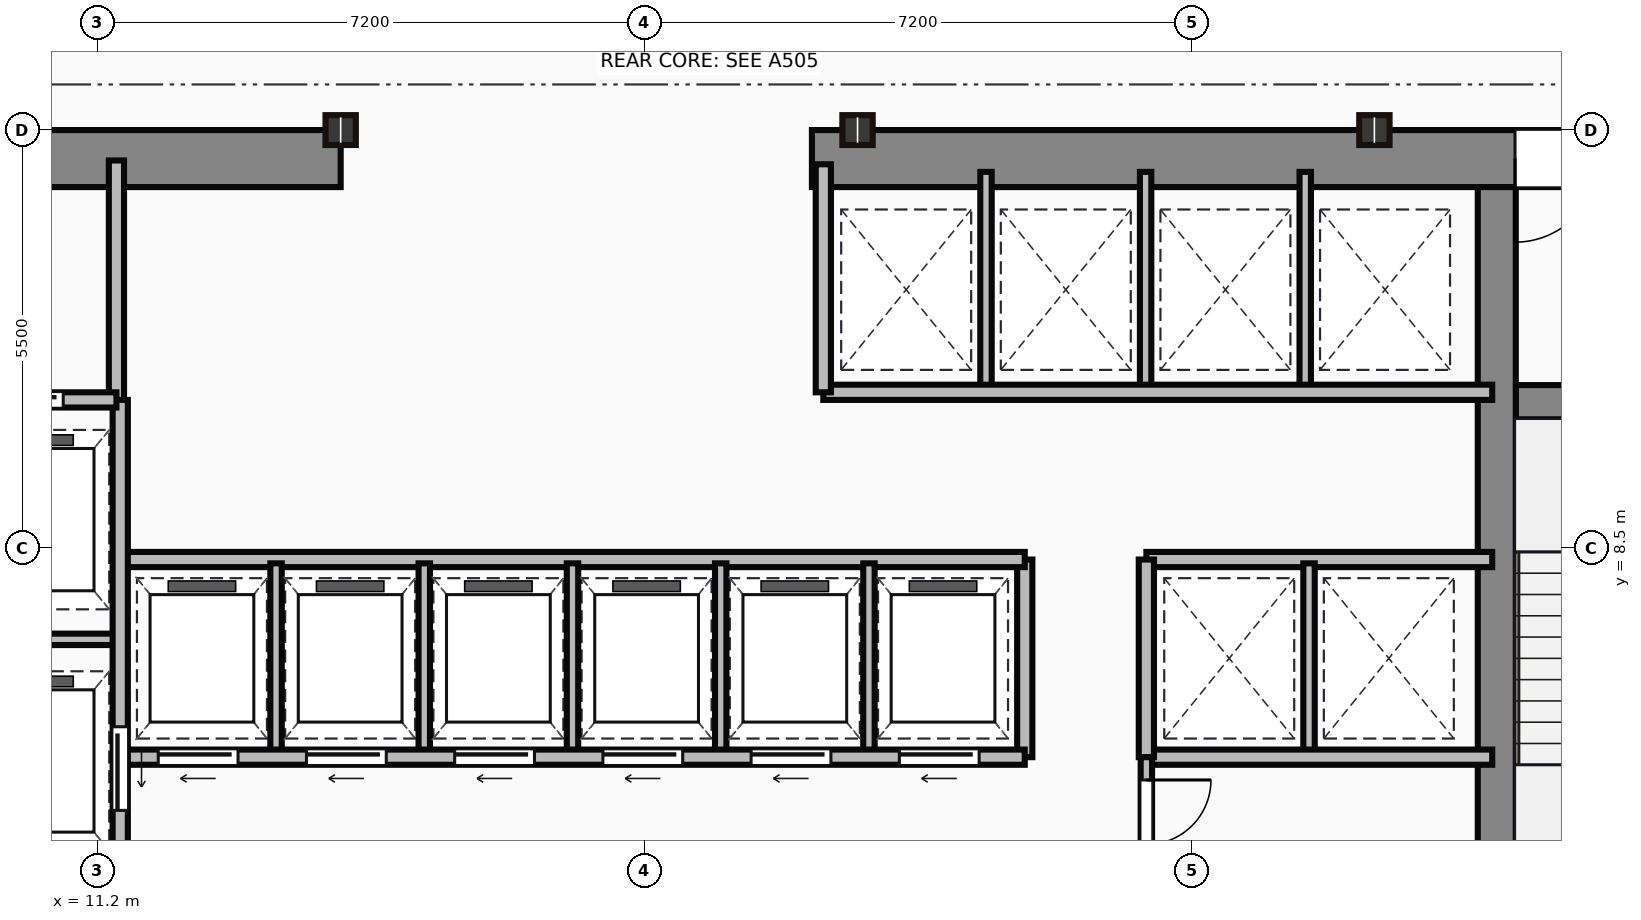
"""IFC4 building model, lengths in metres.
Left out: names, types, materials, properties, quantities, classifications, styles, units other than length and angle.
Written with IfcOpenShell. Run it as: python <this file> out.ifc"""

import sys

from ifc_helpers import new_model, si_unit, direction, frame, frame_2d, origin, origin_2d, place, context, subcontext, project, spatial, rectangle, i_section, extrude, source, transform, mapped, element, fill, save


model = new_model("IFC4")
c1 = context("Model", 3, precision=1e-05, world=origin(), true_north=direction((0.0, 1.0)))
c2 = subcontext(c1, "Body", "Model", "MODEL_VIEW")
j1 = project(units=[si_unit("LENGTHUNIT", "METRE"), si_unit("PLANEANGLEUNIT", "RADIAN")], contexts=[c1])
p1 = place(None, origin())
s1 = spatial("IfcSite", under=j1, at=p1, CompositionType="ELEMENT")
p2 = place(p1, origin())
s2 = spatial("IfcBuilding", under=s1, at=p2, CompositionType="ELEMENT")
p3 = place(p2, frame((0.0, 0.0, 106.9)))
s3 = spatial("IfcBuildingStorey", under=s2, at=p3, CompositionType="ELEMENT", Elevation=106.9)
m1 = source(origin(), c2, "Body", "SweptSolid", [
    extrude(rectangle(XDim=9.1, YDim=0.75, at=frame_2d((4.55, 0.0))), origin(), (0.0, 0.0, 1.0), 3.65),
])
p4 = place(p3, frame((5.3, 13.625, 0.0), z_axis=(0.0, 0.0, 1.0), x_axis=(1.0, 0.0, 0.0)))
e1 = element("IfcWall", 1, at=p4, inside=s3, PredefinedType="SHEAR", context=c2, shape_type="MappedRepresentation", body=[
    mapped(m1, transform((0.0, 0.0, 0.0))),
])
p5 = place(p4, frame((4.1, 0.0, 0.0)))
e2 = element("IfcOpeningElement", 2, at=p5, cuts=e1, PredefinedType="OPENING", context=c2, shape_type="SweptSolid", body=[
    extrude(rectangle(XDim=1.1, YDim=2.15, at=frame_2d((0.55, 1.075))), frame((0.0, 0.385, 0.0), z_axis=(0.0, -1.0, 0.0), x_axis=(1.0, 0.0, 0.0)), (0.0, 0.0, 1.0), 0.77),
])
m2 = source(origin(), c2, "Body", "SweptSolid", [
    extrude(rectangle(XDim=12.6, YDim=0.75, at=frame_2d((6.3, 0.0))), origin(), (0.0, 0.0, 1.0), 3.65),
])
p6 = place(p3, frame((20.6, 13.625, 0.0), z_axis=(0.0, 0.0, 1.0), x_axis=(1.0, 0.0, 0.0)))
e3 = element("IfcWall", 3, at=p6, inside=s3, PredefinedType="SHEAR", context=c2, shape_type="MappedRepresentation", body=[
    mapped(m2, transform((0.0, 0.0, 0.0))),
])
p7 = place(p6, frame((9.25, 0.0, 0.0)))
e4 = element("IfcOpeningElement", 4, at=p7, cuts=e3, PredefinedType="OPENING", context=c2, shape_type="SweptSolid", body=[
    extrude(rectangle(XDim=1.1, YDim=2.15, at=frame_2d((0.55, 1.075))), frame((0.0, 0.385, 0.0), z_axis=(0.0, -1.0, 0.0), x_axis=(1.0, 0.0, 0.0)), (0.0, 0.0, 1.0), 0.77),
])
m3 = source(origin(), c2, "Body", "SweptSolid", [
    extrude(rectangle(XDim=12.35, YDim=0.5, at=frame_2d((6.175, 0.0))), origin(), (0.0, 0.0, 1.0), 3.65),
])
p8 = place(p3, frame((29.61, 0.9, 0.0), z_axis=(0.0, 0.0, 1.0), x_axis=(0.0, 1.0, 0.0)))
e5 = element("IfcWall", 5, at=p8, inside=s3, PredefinedType="SHEAR", context=c2, shape_type="MappedRepresentation", body=[
    mapped(m3, transform((0.0, 0.0, 0.0))),
])
m4 = source(origin(), c2, "Body", "SweptSolid", [
    extrude(rectangle(XDim=3.39, YDim=0.45, at=frame_2d((1.695, 0.0))), origin(), (0.0, 0.0, 1.0), 3.65),
])
p9 = place(p3, frame((29.86, 10.42, 0.0), z_axis=(0.0, 0.0, 1.0), x_axis=(1.0, 0.0, 0.0)))
e6 = element("IfcWall", 6, at=p9, inside=s3, PredefinedType="SHEAR", context=c2, shape_type="MappedRepresentation", body=[
    mapped(m4, transform((0.0, 0.0, 0.0))),
])
p10 = place(p9, frame((1.1, 0.0, 0.0)))
e7 = element("IfcOpeningElement", 7, at=p10, cuts=e6, PredefinedType="OPENING", context=c2, shape_type="SweptSolid", body=[
    extrude(rectangle(XDim=1.1, YDim=2.15, at=frame_2d((0.55, 1.075))), frame((0.0, 0.235, 0.0), z_axis=(0.0, -1.0, 0.0), x_axis=(1.0, 0.0, 0.0)), (0.0, 0.0, 1.0), 0.47),
])
m5 = source(origin(), c2, "Body", "SweptSolid", [
    extrude(i_section(OverallWidth=0.399, OverallDepth=0.393, WebThickness=0.023, FlangeThickness=0.037, at=origin_2d()), origin(), (0.0, 0.0, 1.0), 3.65),
])
for number, where, z_axis, x_axis in (
    (8, (14.4, 14.0, 0.0), (0.0, 0.0, 1.0), (1.0, 0.0, 0.0)),
    (9, (21.2, 14.0, 0.0), (0.0, 0.0, 1.0), (1.0, 0.0, 0.0)),
    (10, (28.0, 14.0, 0.0), (0.0, 0.0, 1.0), (1.0, 0.0, 0.0)),
):
    element("IfcColumn", number, at=place(p3, frame(where, z_axis=z_axis, x_axis=x_axis)), inside=s3, PredefinedType="COLUMN", context=c2, shape_type="MappedRepresentation", body=[
        mapped(m5, transform((0.0, 0.0, 0.0))),
    ])
m6 = source(origin(), c2, "Body", "SweptSolid", [
    extrude(rectangle(XDim=3.18, YDim=0.2, at=frame_2d((1.59, 0.0))), origin(), (0.0, 0.0, 1.0), 3.4),
])
p11 = place(p3, frame((11.45, 10.42, 0.0), z_axis=(0.0, 0.0, 1.0), x_axis=(0.0, 1.0, 0.0)))
e11 = element("IfcWall", 11, at=p11, inside=s3, PredefinedType="PARTITIONING", context=c2, shape_type="MappedRepresentation", body=[
    mapped(m6, transform((0.0, 0.0, 0.0))),
])
m7 = source(origin(), c2, "Body", "SweptSolid", [
    extrude(rectangle(XDim=2.35, YDim=0.2, at=frame_2d((1.175, 0.0))), origin(), (0.0, 0.0, 1.0), 3.4),
])
p12 = place(p3, frame((9.1, 10.45, 0.0), z_axis=(0.0, 0.0, 1.0), x_axis=(1.0, 0.0, 0.0)))
e12 = element("IfcWall", 12, at=p12, inside=s3, PredefinedType="PARTITIONING", context=c2, shape_type="MappedRepresentation", body=[
    mapped(m7, transform((0.0, 0.0, 0.0))),
])
p13 = place(p12, frame((0.55, 0.0, 0.0)))
e13 = element("IfcOpeningElement", 13, at=p13, cuts=e12, PredefinedType="OPENING", context=c2, shape_type="SweptSolid", body=[
    extrude(rectangle(XDim=1.1, YDim=2.15, at=frame_2d((0.55, 1.075))), frame((0.0, 0.11, 0.0), z_axis=(0.0, -1.0, 0.0), x_axis=(1.0, 0.0, 0.0)), (0.0, 0.0, 1.0), 0.22),
])
m8 = source(origin(), c2, "Body", "SweptSolid", [
    extrude(rectangle(XDim=9.6, YDim=0.2, at=frame_2d((4.8, 0.0))), origin(), (0.0, 0.0, 1.0), 3.4),
])
p14 = place(p3, frame((11.5, 0.85, 0.0), z_axis=(0.0, 0.0, 1.0), x_axis=(0.0, 1.0, 0.0)))
e14 = element("IfcWall", 14, at=p14, inside=s3, PredefinedType="PARTITIONING", context=c2, shape_type="MappedRepresentation", body=[
    mapped(m8, transform((0.0, 0.0, 0.0))),
])
p15 = place(p14, frame((4.2, 0.0, 0.0)))
e15 = element("IfcOpeningElement", 15, at=p15, cuts=e14, PredefinedType="OPENING", context=c2, shape_type="SweptSolid", body=[
    extrude(rectangle(XDim=1.1, YDim=2.15, at=frame_2d((0.55, 1.075))), frame((0.0, 0.11, 0.0), z_axis=(0.0, -1.0, 0.0), x_axis=(1.0, 0.0, 0.0)), (0.0, 0.0, 1.0), 0.22),
])
p16 = place(p14, frame((0.9, 0.0, 0.0)))
e16 = element("IfcOpeningElement", 16, at=p16, cuts=e14, PredefinedType="OPENING", context=c2, shape_type="SweptSolid", body=[
    extrude(rectangle(XDim=1.2, YDim=2.15, at=frame_2d((0.6, 1.075))), frame((0.0, 0.11, 0.0), z_axis=(0.0, -1.0, 0.0), x_axis=(1.0, 0.0, 0.0)), (0.0, 0.0, 1.0), 0.22),
])
m9 = source(origin(), c2, "Body", "SweptSolid", [
    extrude(rectangle(XDim=2.4, YDim=0.15, at=frame_2d((1.2, 0.0))), origin(), (0.0, 0.0, 1.0), 3.4),
])
p17 = place(p3, frame((9.1, 7.3, 0.0), z_axis=(0.0, 0.0, 1.0), x_axis=(1.0, 0.0, 0.0)))
e17 = element("IfcWall", 17, at=p17, inside=s3, PredefinedType="PARTITIONING", context=c2, shape_type="MappedRepresentation", body=[
    mapped(m9, transform((0.0, 0.0, 0.0))),
])
m10 = source(origin(), c2, "Body", "SweptSolid", [
    extrude(rectangle(XDim=11.85, YDim=0.2, at=frame_2d((5.925, 0.0))), origin(), (0.0, 0.0, 1.0), 3.4),
])
p18 = place(p3, frame((11.55, 5.75, 0.0), z_axis=(0.0, 0.0, 1.0), x_axis=(1.0, 0.0, 0.0)))
e18 = element("IfcWall", 18, at=p18, inside=s3, PredefinedType="PARTITIONING", context=c2, shape_type="MappedRepresentation", body=[
    mapped(m10, transform((0.0, 0.0, 0.0))),
])
p19 = place(p18, frame((0.45, 0.0, 0.0)))
e19 = element("IfcOpeningElement", 19, at=p19, cuts=e18, PredefinedType="OPENING", context=c2, shape_type="SweptSolid", body=[
    extrude(rectangle(XDim=1.05, YDim=2.15, at=frame_2d((0.525, 1.075))), frame((0.0, 0.11, 0.0), z_axis=(0.0, -1.0, 0.0), x_axis=(1.0, 0.0, 0.0)), (0.0, 0.0, 1.0), 0.22),
])
p20 = place(p18, frame((2.4, 0.0, 0.0)))
e20 = element("IfcOpeningElement", 20, at=p20, cuts=e18, PredefinedType="OPENING", context=c2, shape_type="SweptSolid", body=[
    extrude(rectangle(XDim=1.05, YDim=2.15, at=frame_2d((0.525, 1.075))), frame((0.0, 0.11, 0.0), z_axis=(0.0, -1.0, 0.0), x_axis=(1.0, 0.0, 0.0)), (0.0, 0.0, 1.0), 0.22),
])
p21 = place(p18, frame((4.35, 0.0, 0.0)))
e21 = element("IfcOpeningElement", 21, at=p21, cuts=e18, PredefinedType="OPENING", context=c2, shape_type="SweptSolid", body=[
    extrude(rectangle(XDim=1.05, YDim=2.15, at=frame_2d((0.525, 1.075))), frame((0.0, 0.11, 0.0), z_axis=(0.0, -1.0, 0.0), x_axis=(1.0, 0.0, 0.0)), (0.0, 0.0, 1.0), 0.22),
])
p22 = place(p18, frame((6.3, 0.0, 0.0)))
e22 = element("IfcOpeningElement", 22, at=p22, cuts=e18, PredefinedType="OPENING", context=c2, shape_type="SweptSolid", body=[
    extrude(rectangle(XDim=1.05, YDim=2.15, at=frame_2d((0.525, 1.075))), frame((0.0, 0.11, 0.0), z_axis=(0.0, -1.0, 0.0), x_axis=(1.0, 0.0, 0.0)), (0.0, 0.0, 1.0), 0.22),
])
p23 = place(p18, frame((8.25, 0.0, 0.0)))
e23 = element("IfcOpeningElement", 23, at=p23, cuts=e18, PredefinedType="OPENING", context=c2, shape_type="SweptSolid", body=[
    extrude(rectangle(XDim=1.05, YDim=2.15, at=frame_2d((0.525, 1.075))), frame((0.0, 0.11, 0.0), z_axis=(0.0, -1.0, 0.0), x_axis=(1.0, 0.0, 0.0)), (0.0, 0.0, 1.0), 0.22),
])
p24 = place(p18, frame((10.2, 0.0, 0.0)))
e24 = element("IfcOpeningElement", 24, at=p24, cuts=e18, PredefinedType="OPENING", context=c2, shape_type="SweptSolid", body=[
    extrude(rectangle(XDim=1.05, YDim=2.15, at=frame_2d((0.525, 1.075))), frame((0.0, 0.11, 0.0), z_axis=(0.0, -1.0, 0.0), x_axis=(1.0, 0.0, 0.0)), (0.0, 0.0, 1.0), 0.22),
])
p25 = place(p3, frame((11.55, 8.35, 0.0), z_axis=(0.0, 0.0, 1.0), x_axis=(1.0, 0.0, 0.0)))
e25 = element("IfcWall", 25, at=p25, inside=s3, PredefinedType="PARTITIONING", context=c2, shape_type="MappedRepresentation", body=[
    mapped(m10, transform((0.0, 0.0, 0.0))),
])
m11 = source(origin(), c2, "Body", "SweptSolid", [
    extrude(rectangle(XDim=2.6, YDim=0.2, at=frame_2d((1.3, 0.0))), origin(), (0.0, 0.0, 1.0), 3.4),
])
p26 = place(p3, frame((23.4, 5.75, 0.0), z_axis=(0.0, 0.0, 1.0), x_axis=(0.0, 1.0, 0.0)))
e26 = element("IfcWall", 26, at=p26, inside=s3, PredefinedType="PARTITIONING", context=c2, shape_type="MappedRepresentation", body=[
    mapped(m11, transform((0.0, 0.0, 0.0))),
])
m12 = source(origin(), c2, "Body", "SweptSolid", [
    extrude(rectangle(XDim=2.5, YDim=0.15, at=frame_2d((1.25, 0.0))), origin(), (0.0, 0.0, 1.0), 3.4),
])
for number, where, z_axis, x_axis in (
    (27, (13.55, 5.8, 0.0), (0.0, 0.0, 1.0), (0.0, 1.0, 0.0)),
    (28, (15.5, 5.8, 0.0), (0.0, 0.0, 1.0), (0.0, 1.0, 0.0)),
    (29, (17.45, 5.8, 0.0), (0.0, 0.0, 1.0), (0.0, 1.0, 0.0)),
    (30, (19.4, 5.8, 0.0), (0.0, 0.0, 1.0), (0.0, 1.0, 0.0)),
    (31, (21.35, 5.8, 0.0), (0.0, 0.0, 1.0), (0.0, 1.0, 0.0)),
):
    element("IfcWall", number, at=place(p3, frame(where, z_axis=z_axis, x_axis=x_axis)), inside=s3, PredefinedType="PARTITIONING", context=c2, shape_type="MappedRepresentation", body=[
        mapped(m12, transform((0.0, 0.0, 0.0))),
    ])
m13 = source(origin(), c2, "Body", "SweptSolid", [
    extrude(rectangle(XDim=8.8, YDim=0.2, at=frame_2d((4.4, 0.0))), origin(), (0.0, 0.0, 1.0), 3.4),
])
p27 = place(p3, frame((20.75, 10.55, 0.0), z_axis=(0.0, 0.0, 1.0), x_axis=(1.0, 0.0, 0.0)))
e32 = element("IfcWall", 32, at=p27, inside=s3, PredefinedType="PARTITIONING", context=c2, shape_type="MappedRepresentation", body=[
    mapped(m13, transform((0.0, 0.0, 0.0))),
])
m14 = source(origin(), c2, "Body", "SweptSolid", [
    extrude(rectangle(XDim=3.0, YDim=0.2, at=frame_2d((1.5, 0.0))), origin(), (0.0, 0.0, 1.0), 3.4),
])
p28 = place(p3, frame((20.75, 10.55, 0.0), z_axis=(0.0, 0.0, 1.0), x_axis=(0.0, 1.0, 0.0)))
e33 = element("IfcWall", 33, at=p28, inside=s3, PredefinedType="PARTITIONING", context=c2, shape_type="MappedRepresentation", body=[
    mapped(m14, transform((0.0, 0.0, 0.0))),
])
m15 = source(origin(), c2, "Body", "SweptSolid", [
    extrude(rectangle(XDim=2.85, YDim=0.15, at=frame_2d((1.425, 0.0))), origin(), (0.0, 0.0, 1.0), 3.4),
])
for number, where, z_axis, x_axis in (
    (34, (22.89, 10.6, 0.0), (0.0, 0.0, 1.0), (0.0, 1.0, 0.0)),
    (35, (24.99, 10.6, 0.0), (0.0, 0.0, 1.0), (0.0, 1.0, 0.0)),
    (36, (27.09, 10.6, 0.0), (0.0, 0.0, 1.0), (0.0, 1.0, 0.0)),
):
    element("IfcWall", number, at=place(p3, frame(where, z_axis=z_axis, x_axis=x_axis)), inside=s3, PredefinedType="PARTITIONING", context=c2, shape_type="MappedRepresentation", body=[
        mapped(m15, transform((0.0, 0.0, 0.0))),
    ])
m16 = source(origin(), c2, "Body", "SweptSolid", [
    extrude(rectangle(XDim=4.55, YDim=0.2, at=frame_2d((2.275, 0.0))), origin(), (0.0, 0.0, 1.0), 3.4),
])
for number, where, z_axis, x_axis in (
    (37, (25.0, 8.35, 0.0), (0.0, 0.0, 1.0), (1.0, 0.0, 0.0)),
    (38, (25.0, 5.75, 0.0), (0.0, 0.0, 1.0), (1.0, 0.0, 0.0)),
):
    element("IfcWall", number, at=place(p3, frame(where, z_axis=z_axis, x_axis=x_axis)), inside=s3, PredefinedType="PARTITIONING", context=c2, shape_type="MappedRepresentation", body=[
        mapped(m16, transform((0.0, 0.0, 0.0))),
    ])
p29 = place(p3, frame((25.0, 5.75, 0.0), z_axis=(0.0, 0.0, 1.0), x_axis=(0.0, 1.0, 0.0)))
e39 = element("IfcWall", 39, at=p29, inside=s3, PredefinedType="PARTITIONING", context=c2, shape_type="MappedRepresentation", body=[
    mapped(m11, transform((0.0, 0.0, 0.0))),
])
p30 = place(p3, frame((27.14, 5.8, 0.0), z_axis=(0.0, 0.0, 1.0), x_axis=(0.0, 1.0, 0.0)))
e40 = element("IfcWall", 40, at=p30, inside=s3, PredefinedType="PARTITIONING", context=c2, shape_type="MappedRepresentation", body=[
    mapped(m12, transform((0.0, 0.0, 0.0))),
])
m17 = source(origin(), c2, "Body", "SweptSolid", [
    extrude(rectangle(XDim=4.9, YDim=0.15, at=frame_2d((2.45, 0.0))), origin(), (0.0, 0.0, 1.0), 3.4),
])
p31 = place(p3, frame((25.0, 0.85, 0.0), z_axis=(0.0, 0.0, 1.0), x_axis=(0.0, 1.0, 0.0)))
e41 = element("IfcWall", 41, at=p31, inside=s3, PredefinedType="PARTITIONING", context=c2, shape_type="MappedRepresentation", body=[
    mapped(m17, transform((0.0, 0.0, 0.0))),
])
p32 = place(p31, frame((2.0, 0.0, 0.0)))
e42 = element("IfcOpeningElement", 42, at=p32, cuts=e41, PredefinedType="OPENING", context=c2, shape_type="SweptSolid", body=[
    extrude(rectangle(XDim=0.95, YDim=2.15, at=frame_2d((0.475, 1.075))), frame((0.0, 0.085, 0.0), z_axis=(0.0, -1.0, 0.0), x_axis=(1.0, 0.0, 0.0)), (0.0, 0.0, 1.0), 0.17),
])
p33 = place(p31, frame((3.75, 0.0, 0.0)))
e43 = element("IfcOpeningElement", 43, at=p33, cuts=e41, PredefinedType="OPENING", context=c2, shape_type="SweptSolid", body=[
    extrude(rectangle(XDim=0.85, YDim=2.15, at=frame_2d((0.425, 1.075))), frame((0.0, 0.085, 0.0), z_axis=(0.0, -1.0, 0.0), x_axis=(1.0, 0.0, 0.0)), (0.0, 0.0, 1.0), 0.17),
])
m18 = source(origin(), c2, "Body", "SweptSolid", [
    extrude(rectangle(XDim=1.1, YDim=2.15, at=frame_2d((0.55, 1.075))), frame((0.0, 0.025, 0.0), z_axis=(0.0, -1.0, 0.0), x_axis=(1.0, 0.0, 0.0)), (0.0, 0.0, 1.0), 0.05),
])
p34 = place(p7, origin())
e44 = element("IfcDoor", 44, at=p34, inside=s3, OperationType="SINGLE_SWING_LEFT", PredefinedType="DOOR", context=c2, shape_type="MappedRepresentation", body=[
    mapped(m18, transform((0.0, 0.0, 0.0))),
])
fill(e4, e44)
p35 = place(p13, origin())
e45 = element("IfcDoor", 45, at=p35, inside=s3, OperationType="SLIDING_TO_LEFT", PredefinedType="DOOR", context=c2, shape_type="MappedRepresentation", body=[
    mapped(m18, transform((0.0, 0.0, 0.0))),
])
fill(e13, e45)
p36 = place(p15, frame((1.1, 0.0, 0.0), z_axis=(0.0, 0.0, 1.0), x_axis=(-1.0, 0.0, 0.0)))
e46 = element("IfcDoor", 46, at=p36, inside=s3, OperationType="SLIDING_TO_LEFT", PredefinedType="DOOR", context=c2, shape_type="MappedRepresentation", body=[
    mapped(m18, transform((0.0, 0.0, 0.0))),
])
fill(e15, e46)
m19 = source(origin(), c2, "Body", "SweptSolid", [
    extrude(rectangle(XDim=1.05, YDim=2.15, at=frame_2d((0.525, 1.075))), frame((0.0, 0.025, 0.0), z_axis=(0.0, -1.0, 0.0), x_axis=(1.0, 0.0, 0.0)), (0.0, 0.0, 1.0), 0.05),
])
p37 = place(p19, frame((1.05, 0.0, 0.0), z_axis=(0.0, 0.0, 1.0), x_axis=(-1.0, 0.0, 0.0)))
e47 = element("IfcDoor", 47, at=p37, inside=s3, OperationType="SLIDING_TO_LEFT", PredefinedType="DOOR", context=c2, shape_type="MappedRepresentation", body=[
    mapped(m19, transform((0.0, 0.0, 0.0))),
])
fill(e19, e47)
p38 = place(p20, frame((1.05, 0.0, 0.0), z_axis=(0.0, 0.0, 1.0), x_axis=(-1.0, 0.0, 0.0)))
e48 = element("IfcDoor", 48, at=p38, inside=s3, OperationType="SLIDING_TO_LEFT", PredefinedType="DOOR", context=c2, shape_type="MappedRepresentation", body=[
    mapped(m19, transform((0.0, 0.0, 0.0))),
])
fill(e20, e48)
p39 = place(p21, frame((1.05, 0.0, 0.0), z_axis=(0.0, 0.0, 1.0), x_axis=(-1.0, 0.0, 0.0)))
e49 = element("IfcDoor", 49, at=p39, inside=s3, OperationType="SLIDING_TO_LEFT", PredefinedType="DOOR", context=c2, shape_type="MappedRepresentation", body=[
    mapped(m19, transform((0.0, 0.0, 0.0))),
])
fill(e21, e49)
p40 = place(p22, frame((1.05, 0.0, 0.0), z_axis=(0.0, 0.0, 1.0), x_axis=(-1.0, 0.0, 0.0)))
e50 = element("IfcDoor", 50, at=p40, inside=s3, OperationType="SLIDING_TO_LEFT", PredefinedType="DOOR", context=c2, shape_type="MappedRepresentation", body=[
    mapped(m19, transform((0.0, 0.0, 0.0))),
])
fill(e22, e50)
p41 = place(p23, frame((1.05, 0.0, 0.0), z_axis=(0.0, 0.0, 1.0), x_axis=(-1.0, 0.0, 0.0)))
e51 = element("IfcDoor", 51, at=p41, inside=s3, OperationType="SLIDING_TO_LEFT", PredefinedType="DOOR", context=c2, shape_type="MappedRepresentation", body=[
    mapped(m19, transform((0.0, 0.0, 0.0))),
])
fill(e23, e51)
p42 = place(p24, frame((1.05, 0.0, 0.0), z_axis=(0.0, 0.0, 1.0), x_axis=(-1.0, 0.0, 0.0)))
e52 = element("IfcDoor", 52, at=p42, inside=s3, OperationType="SLIDING_TO_LEFT", PredefinedType="DOOR", context=c2, shape_type="MappedRepresentation", body=[
    mapped(m19, transform((0.0, 0.0, 0.0))),
])
fill(e24, e52)
m20 = source(origin(), c2, "Body", "SweptSolid", [
    extrude(rectangle(XDim=0.85, YDim=2.15, at=frame_2d((0.425, 1.075))), frame((0.0, 0.025, 0.0), z_axis=(0.0, -1.0, 0.0), x_axis=(1.0, 0.0, 0.0)), (0.0, 0.0, 1.0), 0.05),
])
p43 = place(p33, origin())
e53 = element("IfcDoor", 53, at=p43, inside=s3, OperationType="SINGLE_SWING_RIGHT", PredefinedType="DOOR", context=c2, shape_type="MappedRepresentation", body=[
    mapped(m20, transform((0.0, 0.0, 0.0))),
])
fill(e43, e53)
save(model, sys.argv[1])
